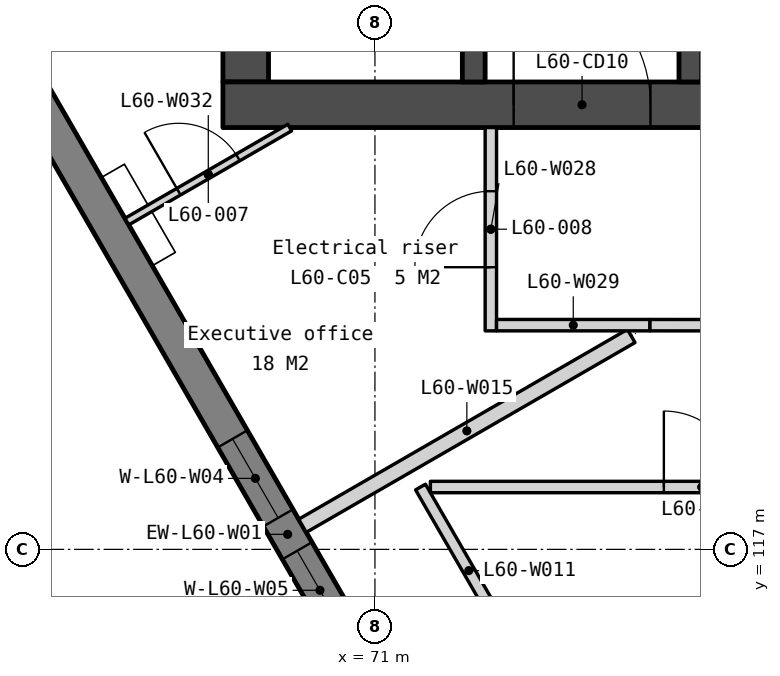
"""IFC4 building model, lengths in metres.
Left out: names, types, materials, properties, quantities, classifications, styles, units other than length and angle.
Written with IfcOpenShell. Run it as: python <this file> out.ifc"""

import sys

from ifc_helpers import new_model, si_unit, direction, frame, frame_2d, origin, place, context, subcontext, project, spatial, polyline, rectangle, outline, extrude, element, fill, save


model = new_model("IFC4")
c1 = context("Model", 3, precision=1e-05, world=origin(), true_north=direction((0.0, 1.0)))
c2 = subcontext(c1, "Body", "Model", "MODEL_VIEW")
j1 = project(units=[si_unit("LENGTHUNIT", "METRE"), si_unit("PLANEANGLEUNIT", "RADIAN")], contexts=[c1])
p1 = place(None, origin())
s1 = spatial("IfcSite", under=j1, at=p1, CompositionType="ELEMENT")
p2 = place(p1, origin())
s2 = spatial("IfcBuilding", under=s1, at=p2, CompositionType="ELEMENT")
p3 = place(p2, frame((0.0, 0.0, 246.5)))
s3 = spatial("IfcBuildingStorey", under=s2, at=p3, CompositionType="ELEMENT", Elevation=246.5)
p4 = place(p3, frame((69.3, 133.95, 0.0), z_axis=(0.0, 0.0, 1.0), x_axis=(0.0, -1.0, 0.0)))
e1 = element("IfcWall", 1, at=p4, inside=s3, PredefinedType="SOLIDWALL", context=c2, shape_type="SweptSolid", body=[
    extrude(rectangle(XDim=10.8, YDim=0.6, at=frame_2d((5.4, 0.0))), origin(), (0.0, 0.0, 1.0), 3.75),
])
p5 = place(p3, frame((69.0, 122.85, 0.0), z_axis=(0.0, 0.0, 1.0), x_axis=(1.0, 0.0, 0.0)))
e2 = element("IfcWall", 2, at=p5, inside=s3, PredefinedType="SOLIDWALL", context=c2, shape_type="SweptSolid", body=[
    extrude(rectangle(XDim=22.0, YDim=0.6, at=frame_2d((11.0, 0.0))), origin(), (0.0, 0.0, 1.0), 3.75),
])
p6 = place(p5, frame((16.375, 0.0, 0.0)))
e3 = element("IfcOpeningElement", 3, at=p6, cuts=e2, PredefinedType="OPENING", context=c2, shape_type="SweptSolid", body=[
    extrude(rectangle(XDim=1.8, YDim=2.1, at=frame_2d((0.9, 1.05))), frame((0.0, 0.31, 0.0), z_axis=(0.0, -1.0, 0.0), x_axis=(1.0, 0.0, 0.0)), (0.0, 0.0, 1.0), 0.62),
])
p7 = place(p5, frame((3.825, 0.0, 0.0)))
e4 = element("IfcOpeningElement", 4, at=p7, cuts=e2, PredefinedType="OPENING", context=c2, shape_type="SweptSolid", body=[
    extrude(rectangle(XDim=1.8, YDim=2.1, at=frame_2d((0.9, 1.05))), frame((0.0, 0.31, 0.0), z_axis=(0.0, -1.0, 0.0), x_axis=(1.0, 0.0, 0.0)), (0.0, 0.0, 1.0), 0.62),
])
p8 = place(p5, frame((12.85, 0.0, 0.0)))
e5 = element("IfcOpeningElement", 5, at=p8, cuts=e2, PredefinedType="OPENING", context=c2, shape_type="SweptSolid", body=[
    extrude(rectangle(XDim=1.5, YDim=2.1, at=frame_2d((0.75, 1.05))), frame((0.0, 0.31, 0.0), z_axis=(0.0, -1.0, 0.0), x_axis=(1.0, 0.0, 0.0)), (0.0, 0.0, 1.0), 0.62),
])
p9 = place(p3, frame((72.3, 133.95, 0.0), z_axis=(0.0, 0.0, 1.0), x_axis=(0.0, -1.0, 0.0)))
e6 = element("IfcWall", 6, at=p9, inside=s3, PredefinedType="SOLIDWALL", context=c2, shape_type="SweptSolid", body=[
    extrude(rectangle(XDim=10.8, YDim=0.3, at=frame_2d((5.4, 0.0))), origin(), (0.0, 0.0, 1.0), 3.75),
])
p10 = place(p9, frame((6.95, 0.0, 0.0)))
e7 = element("IfcOpeningElement", 7, at=p10, cuts=e6, PredefinedType="OPENING", context=c2, shape_type="SweptSolid", body=[
    extrude(rectangle(XDim=1.1, YDim=2.1, at=frame_2d((0.55, 1.05))), frame((0.0, 0.16, 0.0), z_axis=(0.0, -1.0, 0.0), x_axis=(1.0, 0.0, 0.0)), (0.0, 0.0, 1.0), 0.32),
])
p11 = place(p9, frame((9.35, 0.0, 0.0)))
e8 = element("IfcOpeningElement", 8, at=p11, cuts=e6, PredefinedType="OPENING", context=c2, shape_type="SweptSolid", body=[
    extrude(rectangle(XDim=0.9, YDim=2.1, at=frame_2d((0.45, 1.05))), frame((0.0, 0.16, 0.0), z_axis=(0.0, -1.0, 0.0), x_axis=(1.0, 0.0, 0.0)), (0.0, 0.0, 1.0), 0.32),
])
p12 = place(p9, frame((5.1, 0.0, 0.0)))
e9 = element("IfcOpeningElement", 9, at=p12, cuts=e6, PredefinedType="OPENING", context=c2, shape_type="SweptSolid", body=[
    extrude(rectangle(XDim=1.0, YDim=2.1, at=frame_2d((0.5, 1.05))), frame((0.0, 0.16, 0.0), z_axis=(0.0, -1.0, 0.0), x_axis=(1.0, 0.0, 0.0)), (0.0, 0.0, 1.0), 0.32),
])
p13 = place(p3, frame((75.15, 125.7, 0.0), z_axis=(0.0, 0.0, 1.0), x_axis=(0.0, -1.0, 0.0)))
e10 = element("IfcWall", 10, at=p13, inside=s3, PredefinedType="SOLIDWALL", context=c2, shape_type="SweptSolid", body=[
    extrude(rectangle(XDim=2.55, YDim=0.3, at=frame_2d((1.275, 0.0))), origin(), (0.0, 0.0, 1.0), 3.75),
])
p14 = place(p3, frame((60.609, 133.207, -0.15), z_axis=(0.0, 0.0, 1.0), x_axis=(0.500002536638, -0.866023939251, 0.0)))
e11 = element("IfcWall", 11, at=p14, inside=s3, PredefinedType="SOLIDWALL", context=c2, shape_type="SweptSolid", body=[
    extrude(outline(polyline([(36.972, 0.0), (36.972, 3.9), (0.0, 3.9), (0.0, 0.0), (36.972, 0.0)])), frame((0.0, 0.225, 0.0), z_axis=(0.0, -1.0, 0.0), x_axis=(1.0, 0.0, 0.0)), (0.0, 0.0, 1.0), 0.45),
])
p15 = place(p14, frame((0.744, 0.0, 0.95)))
e12 = element("IfcOpeningElement", 12, at=p15, cuts=e11, PredefinedType="OPENING", context=c2, shape_type="SweptSolid", body=[
    extrude(rectangle(XDim=1.2, YDim=2.2, at=frame_2d((0.6, 1.1))), frame((0.0, 0.235, 0.0), z_axis=(0.0, -1.0, 0.0), x_axis=(1.0, 0.0, 0.0)), (0.0, 0.0, 1.0), 0.47),
])
p16 = place(p14, frame((7.793, 0.0, 0.95)))
e13 = element("IfcOpeningElement", 13, at=p16, cuts=e11, PredefinedType="OPENING", context=c2, shape_type="SweptSolid", body=[
    extrude(rectangle(XDim=1.2, YDim=2.2, at=frame_2d((0.6, 1.1))), frame((0.0, 0.235, 0.0), z_axis=(0.0, -1.0, 0.0), x_axis=(1.0, 0.0, 0.0)), (0.0, 0.0, 1.0), 0.47),
])
p17 = place(p14, frame((9.493, 0.0, 0.95)))
e14 = element("IfcOpeningElement", 14, at=p17, cuts=e11, PredefinedType="OPENING", context=c2, shape_type="SweptSolid", body=[
    extrude(rectangle(XDim=1.2, YDim=2.2, at=frame_2d((0.6, 1.1))), frame((0.0, 0.235, 0.0), z_axis=(0.0, -1.0, 0.0), x_axis=(1.0, 0.0, 0.0)), (0.0, 0.0, 1.0), 0.47),
])
p18 = place(p14, frame((17.036, 0.0, 0.95)))
e15 = element("IfcOpeningElement", 15, at=p18, cuts=e11, PredefinedType="OPENING", context=c2, shape_type="SweptSolid", body=[
    extrude(rectangle(XDim=1.2, YDim=2.2, at=frame_2d((0.6, 1.1))), frame((0.0, 0.235, 0.0), z_axis=(0.0, -1.0, 0.0), x_axis=(1.0, 0.0, 0.0)), (0.0, 0.0, 1.0), 0.47),
])
p19 = place(p14, frame((18.736, 0.0, 0.95)))
e16 = element("IfcOpeningElement", 16, at=p19, cuts=e11, PredefinedType="OPENING", context=c2, shape_type="SweptSolid", body=[
    extrude(rectangle(XDim=1.2, YDim=2.2, at=frame_2d((0.6, 1.1))), frame((0.0, 0.235, 0.0), z_axis=(0.0, -1.0, 0.0), x_axis=(1.0, 0.0, 0.0)), (0.0, 0.0, 1.0), 0.47),
])
p20 = place(p14, frame((26.279, 0.0, 0.95)))
e17 = element("IfcOpeningElement", 17, at=p20, cuts=e11, PredefinedType="OPENING", context=c2, shape_type="SweptSolid", body=[
    extrude(rectangle(XDim=1.2, YDim=2.2, at=frame_2d((0.6, 1.1))), frame((0.0, 0.235, 0.0), z_axis=(0.0, -1.0, 0.0), x_axis=(1.0, 0.0, 0.0)), (0.0, 0.0, 1.0), 0.47),
])
p21 = place(p14, frame((27.979, 0.0, 0.95)))
e18 = element("IfcOpeningElement", 18, at=p21, cuts=e11, PredefinedType="OPENING", context=c2, shape_type="SweptSolid", body=[
    extrude(rectangle(XDim=1.2, YDim=2.2, at=frame_2d((0.6, 1.1))), frame((0.0, 0.235, 0.0), z_axis=(0.0, -1.0, 0.0), x_axis=(1.0, 0.0, 0.0)), (0.0, 0.0, 1.0), 0.47),
])
p22 = place(p14, frame((35.028, 0.0, 0.95)))
e19 = element("IfcOpeningElement", 19, at=p22, cuts=e11, PredefinedType="OPENING", context=c2, shape_type="SweptSolid", body=[
    extrude(rectangle(XDim=1.2, YDim=2.2, at=frame_2d((0.6, 1.1))), frame((0.0, 0.235, 0.0), z_axis=(0.0, -1.0, 0.0), x_axis=(1.0, 0.0, 0.0)), (0.0, 0.0, 1.0), 0.47),
])
p23 = place(p3, frame((71.6, 117.82, 0.0), z_axis=(0.0, 0.0, 1.0), x_axis=(0.500035802948, -0.866004731956, 0.0)))
e20 = element("IfcWall", 20, at=p23, inside=s3, PredefinedType="PARTITIONING", context=c2, shape_type="SweptSolid", body=[
    extrude(rectangle(XDim=2.54, YDim=0.15, at=frame_2d((1.27, 0.0))), origin(), (0.0, 0.0, 1.0), 3.75),
])
p24 = place(p3, frame((70.047, 117.31, 0.0), z_axis=(0.0, 0.0, 1.0), x_axis=(0.866032544947, 0.499987630939, 0.0)))
e21 = element("IfcWall", 21, at=p24, inside=s3, PredefinedType="PARTITIONING", context=c2, shape_type="SweptSolid", body=[
    extrude(rectangle(XDim=4.994, YDim=0.2, at=frame_2d((2.497, 0.0))), origin(), (0.0, 0.0, 1.0), 3.75),
])
p25 = place(p3, frame((71.729, 117.82, 0.0), z_axis=(0.0, 0.0, 1.0), x_axis=(1.0, 0.0, 0.0)))
e22 = element("IfcWall", 22, at=p25, inside=s3, PredefinedType="PARTITIONING", context=c2, shape_type="SweptSolid", body=[
    extrude(rectangle(XDim=7.144, YDim=0.15, at=frame_2d((3.572, 0.0))), origin(), (0.0, 0.0, 1.0), 3.75),
])
p26 = place(p25, frame((3.072, 0.0, 0.0)))
e23 = element("IfcOpeningElement", 23, at=p26, cuts=e22, PredefinedType="OPENING", context=c2, shape_type="SweptSolid", body=[
    extrude(rectangle(XDim=1.0, YDim=2.1, at=frame_2d((0.5, 1.05))), frame((0.0, 0.085, 0.0), z_axis=(0.0, -1.0, 0.0), x_axis=(1.0, 0.0, 0.0)), (0.0, 0.0, 1.0), 0.17),
])
p27 = place(p3, frame((72.525, 119.875, 0.0), z_axis=(0.0, 0.0, 1.0), x_axis=(0.0, 1.0, 0.0)))
e24 = element("IfcWall", 24, at=p27, inside=s3, PredefinedType="PARTITIONING", context=c2, shape_type="SweptSolid", body=[
    extrude(rectangle(XDim=2.675, YDim=0.15, at=frame_2d((1.337, 0.0))), origin(), (0.0, 0.0, 1.0), 3.75),
])
p28 = place(p27, frame((0.837, 0.0, 0.0)))
e25 = element("IfcOpeningElement", 25, at=p28, cuts=e24, PredefinedType="OPENING", context=c2, shape_type="SweptSolid", body=[
    extrude(rectangle(XDim=1.0, YDim=2.1, at=frame_2d((0.5, 1.05))), frame((0.0, 0.085, 0.0), z_axis=(0.0, -1.0, 0.0), x_axis=(1.0, 0.0, 0.0)), (0.0, 0.0, 1.0), 0.17),
])
p29 = place(p3, frame((72.6, 119.95, 0.0), z_axis=(0.0, 0.0, 1.0), x_axis=(1.0, 0.0, 0.0)))
e26 = element("IfcWall", 26, at=p29, inside=s3, PredefinedType="PARTITIONING", context=c2, shape_type="SweptSolid", body=[
    extrude(rectangle(XDim=2.019, YDim=0.15, at=frame_2d((1.009, 0.0))), origin(), (0.0, 0.0, 1.0), 3.75),
])
p30 = place(p3, frame((74.619, 119.95, 0.0), z_axis=(0.0, 0.0, 1.0), x_axis=(0.999999886891, -0.000475624203, 0.0)))
e27 = element("IfcWall", 27, at=p30, inside=s3, PredefinedType="PARTITIONING", context=c2, shape_type="SweptSolid", body=[
    extrude(rectangle(XDim=4.106, YDim=0.15, at=frame_2d((2.053, 0.0))), origin(), (0.0, 0.0, 1.0), 3.75),
])
p31 = place(p3, frame((67.736, 121.313, 0.0), z_axis=(0.0, 0.0, 1.0), x_axis=(0.866024577697, 0.500001430823, 0.0)))
e28 = element("IfcWall", 28, at=p31, inside=s3, PredefinedType="PARTITIONING", context=c2, shape_type="SweptSolid", body=[
    extrude(rectangle(XDim=2.475, YDim=0.1, at=frame_2d((1.237, 0.0))), origin(), (0.0, 0.0, 1.0), 3.75),
])
p32 = place(p31, frame((0.787, 0.0, 0.0)))
e29 = element("IfcOpeningElement", 29, at=p32, cuts=e28, PredefinedType="OPENING", context=c2, shape_type="SweptSolid", body=[
    extrude(rectangle(XDim=0.9, YDim=2.1, at=frame_2d((0.45, 1.05))), frame((0.0, 0.06, 0.0), z_axis=(0.0, -1.0, 0.0), x_axis=(1.0, 0.0, 0.0)), (0.0, 0.0, 1.0), 0.12),
])
p33 = place(p7, origin())
e30 = element("IfcDoor", 30, at=p33, inside=s3, OperationType="DOUBLE_DOOR_DOUBLE_SWING", PredefinedType="DOOR", context=c2, shape_type="SweptSolid", body=[
    extrude(rectangle(XDim=1.8, YDim=2.1, at=frame_2d((0.9, 1.05))), frame((0.0, 0.025, 0.0), z_axis=(0.0, -1.0, 0.0), x_axis=(1.0, 0.0, 0.0)), (0.0, 0.0, 1.0), 0.05),
])
fill(e4, e30)
p34 = place(p18, origin())
e31 = element("IfcWindow", 31, at=p34, inside=s3, PartitioningType="SINGLE_PANEL", PredefinedType="WINDOW", context=c2, shape_type="SweptSolid", body=[
    extrude(rectangle(XDim=1.2, YDim=2.2, at=frame_2d((0.6, 1.1))), frame((0.0, 0.03, 0.0), z_axis=(0.0, -1.0, 0.0), x_axis=(1.0, 0.0, 0.0)), (0.0, 0.0, 1.0), 0.06),
])
fill(e15, e31)
p35 = place(p19, origin())
e32 = element("IfcWindow", 32, at=p35, inside=s3, PartitioningType="SINGLE_PANEL", PredefinedType="WINDOW", context=c2, shape_type="SweptSolid", body=[
    extrude(rectangle(XDim=1.2, YDim=2.2, at=frame_2d((0.6, 1.1))), frame((0.0, 0.03, 0.0), z_axis=(0.0, -1.0, 0.0), x_axis=(1.0, 0.0, 0.0)), (0.0, 0.0, 1.0), 0.06),
])
fill(e16, e32)
p36 = place(p32, origin())
e33 = element("IfcDoor", 33, at=p36, inside=s3, OperationType="SINGLE_SWING_LEFT", PredefinedType="DOOR", context=c2, shape_type="SweptSolid", body=[
    extrude(rectangle(XDim=0.9, YDim=2.1, at=frame_2d((0.45, 1.05))), frame((0.0, 0.025, 0.0), z_axis=(0.0, -1.0, 0.0), x_axis=(1.0, 0.0, 0.0)), (0.0, 0.0, 1.0), 0.05),
])
fill(e29, e33)
p37 = place(p28, origin())
e34 = element("IfcDoor", 34, at=p37, inside=s3, OperationType="SINGLE_SWING_LEFT", PredefinedType="DOOR", context=c2, shape_type="SweptSolid", body=[
    extrude(rectangle(XDim=1.0, YDim=2.1, at=frame_2d((0.5, 1.05))), frame((0.0, 0.025, 0.0), z_axis=(0.0, -1.0, 0.0), x_axis=(1.0, 0.0, 0.0)), (0.0, 0.0, 1.0), 0.05),
])
fill(e25, e34)
p38 = place(p26, origin())
e35 = element("IfcDoor", 35, at=p38, inside=s3, OperationType="SINGLE_SWING_LEFT", PredefinedType="DOOR", context=c2, shape_type="SweptSolid", body=[
    extrude(rectangle(XDim=1.0, YDim=2.1, at=frame_2d((0.5, 1.05))), frame((0.0, 0.025, 0.0), z_axis=(0.0, -1.0, 0.0), x_axis=(1.0, 0.0, 0.0)), (0.0, 0.0, 1.0), 0.05),
])
fill(e23, e35)
save(model, sys.argv[1])
